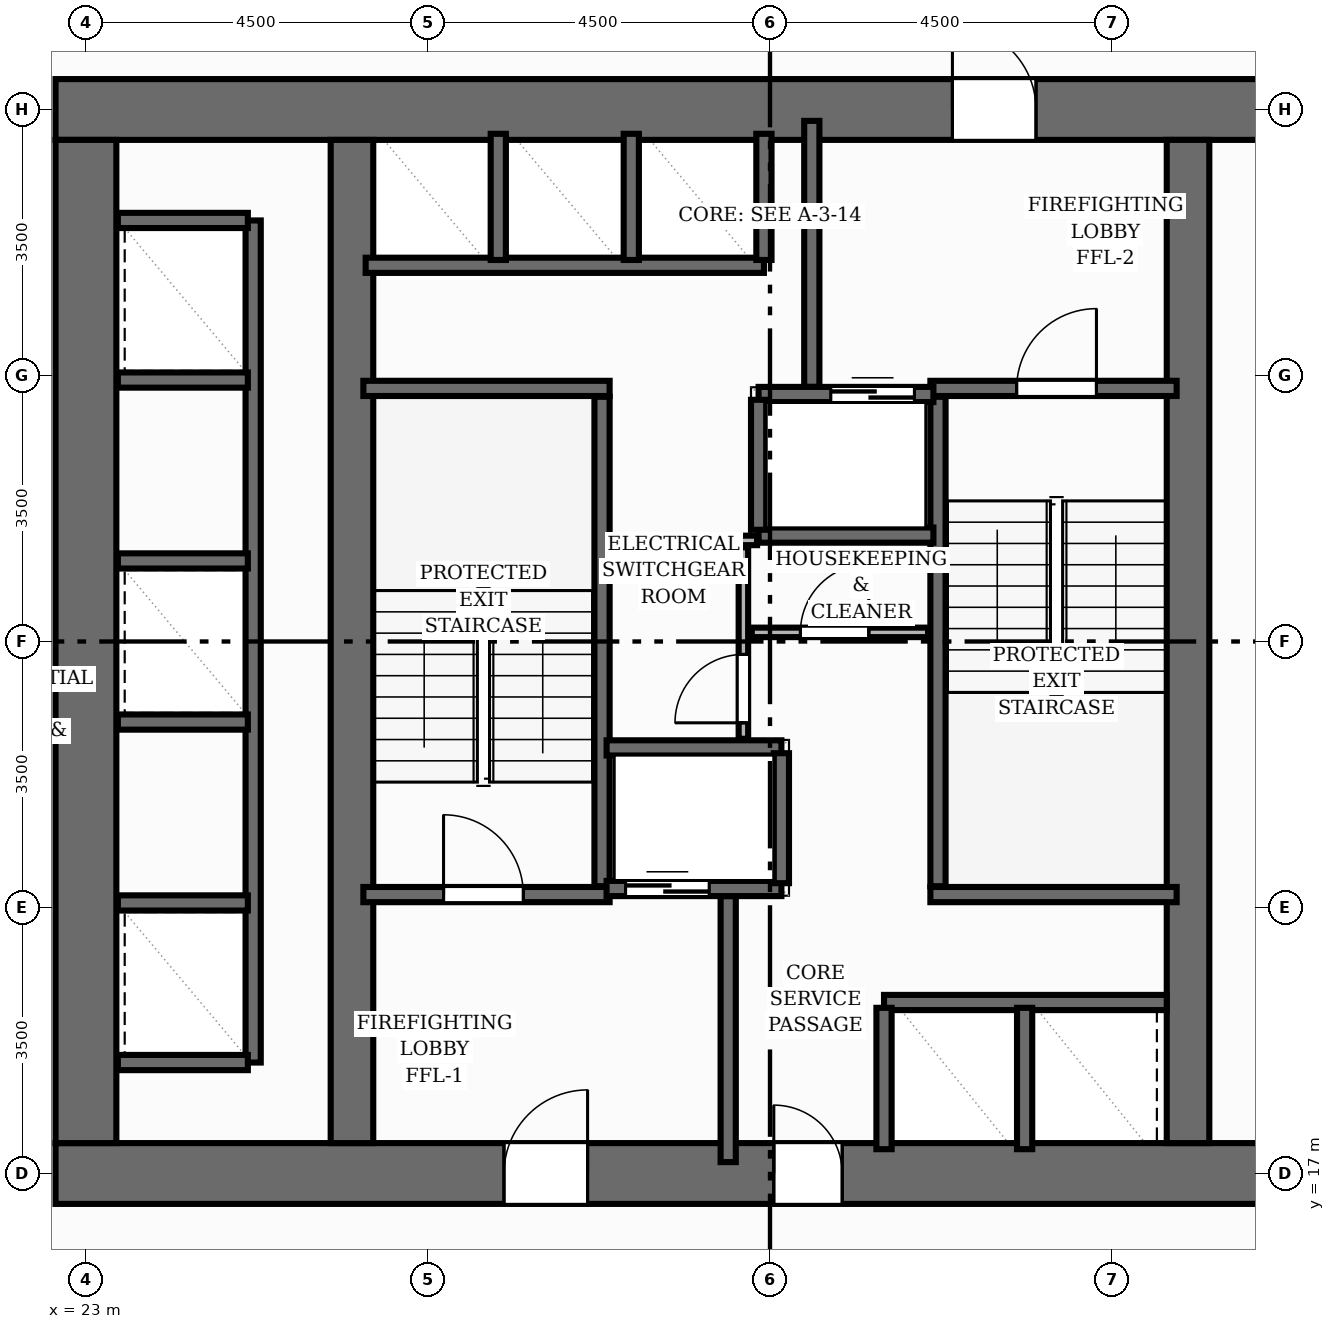
"""IFC4 building model, lengths in metres.
Left out: names, types, materials, properties, quantities, classifications, styles, units other than length and angle.
Written with IfcOpenShell. Run it as: python <this file> out.ifc"""

import sys

from ifc_helpers import new_model, si_unit, direction, frame, frame_2d, origin, place, context, subcontext, project, spatial, rectangle, extrude, element, fill, save


model = new_model("IFC4")
c1 = context("Model", 3, precision=1e-05, world=origin(), true_north=direction((0.0, 1.0)))
c2 = subcontext(c1, "Body", "Model", "MODEL_VIEW")
j1 = project(units=[si_unit("LENGTHUNIT", "METRE"), si_unit("PLANEANGLEUNIT", "RADIAN")], contexts=[c1])
p1 = place(None, origin())
s1 = spatial("IfcSite", under=j1, at=p1, CompositionType="ELEMENT")
p2 = place(p1, origin())
s2 = spatial("IfcBuilding", under=s1, at=p2, CompositionType="ELEMENT")
p3 = place(p2, frame((0.0, 0.0, 53.6)))
s3 = spatial("IfcBuildingStorey", under=s2, at=p3, CompositionType="ELEMENT", Elevation=53.6)
p4 = place(p3, frame((22.6, 17.0, 0.0), z_axis=(0.0, 0.0, 1.0), x_axis=(1.0, 0.0, 0.0)))
e1 = element("IfcWall", 1, at=p4, inside=s3, PredefinedType="SHEAR", context=c2, shape_type="SweptSolid", body=[
    extrude(rectangle(XDim=18.8, YDim=0.8, at=frame_2d((9.4, 0.0))), origin(), (0.0, 0.0, 1.0), 3.2),
])
p5 = place(p4, frame((5.9, 0.0, 0.0)))
e2 = element("IfcOpeningElement", 2, at=p5, cuts=e1, PredefinedType="OPENING", context=c2, shape_type="SweptSolid", body=[
    extrude(rectangle(XDim=1.1, YDim=2.15, at=frame_2d((0.55, 1.075))), frame((0.0, 0.41, 0.0), z_axis=(0.0, -1.0, 0.0), x_axis=(1.0, 0.0, 0.0)), (0.0, 0.0, 1.0), 0.82),
])
p6 = place(p4, frame((9.45, 0.0, 0.0)))
e3 = element("IfcOpeningElement", 3, at=p6, cuts=e1, PredefinedType="OPENING", context=c2, shape_type="SweptSolid", body=[
    extrude(rectangle(XDim=0.9, YDim=2.1, at=frame_2d((0.45, 1.05))), frame((0.0, 0.41, 0.0), z_axis=(0.0, -1.0, 0.0), x_axis=(1.0, 0.0, 0.0)), (0.0, 0.0, 1.0), 0.82),
])
p7 = place(p3, frame((22.6, 31.0, 0.0), z_axis=(0.0, 0.0, 1.0), x_axis=(1.0, 0.0, 0.0)))
e4 = element("IfcWall", 4, at=p7, inside=s3, PredefinedType="SHEAR", context=c2, shape_type="SweptSolid", body=[
    extrude(rectangle(XDim=18.8, YDim=0.8, at=frame_2d((9.4, 0.0))), origin(), (0.0, 0.0, 1.0), 3.2),
])
p8 = place(p7, frame((11.8, 0.0, 0.0)))
e5 = element("IfcOpeningElement", 5, at=p8, cuts=e4, PredefinedType="OPENING", context=c2, shape_type="SweptSolid", body=[
    extrude(rectangle(XDim=1.1, YDim=2.15, at=frame_2d((0.55, 1.075))), frame((0.0, 0.41, 0.0), z_axis=(0.0, -1.0, 0.0), x_axis=(1.0, 0.0, 0.0)), (0.0, 0.0, 1.0), 0.82),
])
p9 = place(p3, frame((23.0, 17.4, 0.0), z_axis=(0.0, 0.0, 1.0), x_axis=(0.0, 1.0, 0.0)))
e6 = element("IfcWall", 6, at=p9, inside=s3, PredefinedType="SHEAR", context=c2, shape_type="SweptSolid", body=[
    extrude(rectangle(XDim=13.2, YDim=0.8, at=frame_2d((6.6, 0.0))), origin(), (0.0, 0.0, 1.0), 3.2),
])
for number, where, z_axis, x_axis in (
    (7, (26.5, 17.4, 0.0), (0.0, 0.0, 1.0), (0.0, 1.0, 0.0)),
    (8, (37.5, 17.4, 0.0), (0.0, 0.0, 1.0), (0.0, 1.0, 0.0)),
):
    element("IfcWall", number, at=place(p3, frame(where, z_axis=z_axis, x_axis=x_axis)), inside=s3, PredefinedType="SHEAR", context=c2, shape_type="SweptSolid", body=[
        extrude(rectangle(XDim=13.2, YDim=0.56, at=frame_2d((6.6, 0.0))), origin(), (0.0, 0.0, 1.0), 3.2),
    ])
p10 = place(p3, frame((29.79, 20.78, 0.0), z_axis=(0.0, 0.0, 1.0), x_axis=(0.0, 1.0, 0.0)))
e9 = element("IfcWall", 9, at=p10, inside=s3, PredefinedType="SHEAR", context=c2, shape_type="SweptSolid", body=[
    extrude(rectangle(XDim=6.44, YDim=0.2, at=frame_2d((3.22, 0.0))), origin(), (0.0, 0.0, 1.0), 3.2),
])
p11 = place(p3, frame((26.65, 27.33, 0.0), z_axis=(0.0, 0.0, 1.0), x_axis=(1.0, 0.0, 0.0)))
e10 = element("IfcWall", 10, at=p11, inside=s3, PredefinedType="SHEAR", context=c2, shape_type="SweptSolid", body=[
    extrude(rectangle(XDim=3.24, YDim=0.2, at=frame_2d((1.62, 0.0))), origin(), (0.0, 0.0, 1.0), 3.2),
])
p12 = place(p3, frame((26.65, 20.67, 0.0), z_axis=(0.0, 0.0, 1.0), x_axis=(1.0, 0.0, 0.0)))
e11 = element("IfcWall", 11, at=p12, inside=s3, PredefinedType="SHEAR", context=c2, shape_type="SweptSolid", body=[
    extrude(rectangle(XDim=3.24, YDim=0.2, at=frame_2d((1.62, 0.0))), origin(), (0.0, 0.0, 1.0), 3.2),
])
p13 = place(p12, frame((1.055, 0.0, 0.0)))
e12 = element("IfcOpeningElement", 12, at=p13, cuts=e11, PredefinedType="OPENING", context=c2, shape_type="SweptSolid", body=[
    extrude(rectangle(XDim=1.05, YDim=2.15, at=frame_2d((0.525, 1.075))), frame((0.0, 0.11, 0.0), z_axis=(0.0, -1.0, 0.0), x_axis=(1.0, 0.0, 0.0)), (0.0, 0.0, 1.0), 0.22),
])
p14 = place(p3, frame((34.21, 20.78, 0.0), z_axis=(0.0, 0.0, 1.0), x_axis=(0.0, 1.0, 0.0)))
e13 = element("IfcWall", 13, at=p14, inside=s3, PredefinedType="SHEAR", context=c2, shape_type="SweptSolid", body=[
    extrude(rectangle(XDim=6.44, YDim=0.2, at=frame_2d((3.22, 0.0))), origin(), (0.0, 0.0, 1.0), 3.2),
])
p15 = place(p3, frame((34.11, 20.67, 0.0), z_axis=(0.0, 0.0, 1.0), x_axis=(1.0, 0.0, 0.0)))
e14 = element("IfcWall", 14, at=p15, inside=s3, PredefinedType="SHEAR", context=c2, shape_type="SweptSolid", body=[
    extrude(rectangle(XDim=3.24, YDim=0.2, at=frame_2d((1.62, 0.0))), origin(), (0.0, 0.0, 1.0), 3.2),
])
p16 = place(p3, frame((34.11, 27.33, 0.0), z_axis=(0.0, 0.0, 1.0), x_axis=(1.0, 0.0, 0.0)))
e15 = element("IfcWall", 15, at=p16, inside=s3, PredefinedType="SHEAR", context=c2, shape_type="SweptSolid", body=[
    extrude(rectangle(XDim=3.24, YDim=0.2, at=frame_2d((1.62, 0.0))), origin(), (0.0, 0.0, 1.0), 3.2),
])
p17 = place(p16, frame((1.135, 0.0, 0.0)))
e16 = element("IfcOpeningElement", 16, at=p17, cuts=e15, PredefinedType="OPENING", context=c2, shape_type="SweptSolid", body=[
    extrude(rectangle(XDim=1.05, YDim=2.15, at=frame_2d((0.525, 1.075))), frame((0.0, 0.11, 0.0), z_axis=(0.0, -1.0, 0.0), x_axis=(1.0, 0.0, 0.0)), (0.0, 0.0, 1.0), 0.22),
])
for number, where, z_axis, x_axis in (
    (17, (31.45, 17.15, 0.0), (0.0, 0.0, 1.0), (0.0, 1.0, 0.0)),
    (18, (32.55, 27.35, 0.0), (0.0, 0.0, 1.0), (0.0, 1.0, 0.0)),
):
    element("IfcWall", number, at=place(p3, frame(where, z_axis=z_axis, x_axis=x_axis)), inside=s3, PredefinedType="SHEAR", context=c2, shape_type="SweptSolid", body=[
        extrude(rectangle(XDim=3.5, YDim=0.2, at=frame_2d((1.75, 0.0))), origin(), (0.0, 0.0, 1.0), 3.2),
    ])
p18 = place(p3, frame((29.85, 20.75, 0.0), z_axis=(0.0, 0.0, 1.0), x_axis=(1.0, 0.0, 0.0)))
e19 = element("IfcWall", 19, at=p18, inside=s3, PredefinedType="SHEAR", context=c2, shape_type="SweptSolid", body=[
    extrude(rectangle(XDim=2.3, YDim=0.2, at=frame_2d((1.15, 0.0))), origin(), (0.0, 0.0, 1.0), 3.2),
])
p19 = place(p18, frame((0.25, 0.0, 0.0)))
e20 = element("IfcOpeningElement", 20, at=p19, cuts=e19, PredefinedType="OPENING", context=c2, shape_type="SweptSolid", body=[
    extrude(rectangle(XDim=1.1, YDim=2.15, at=frame_2d((0.55, 1.075))), frame((0.0, 0.11, 0.0), z_axis=(0.0, -1.0, 0.0), x_axis=(1.0, 0.0, 0.0)), (0.0, 0.0, 1.0), 0.22),
])
p20 = place(p3, frame((29.85, 22.6, 0.0), z_axis=(0.0, 0.0, 1.0), x_axis=(1.0, 0.0, 0.0)))
e21 = element("IfcWall", 21, at=p20, inside=s3, PredefinedType="SHEAR", context=c2, shape_type="SweptSolid", body=[
    extrude(rectangle(XDim=2.3, YDim=0.2, at=frame_2d((1.15, 0.0))), origin(), (0.0, 0.0, 1.0), 3.2),
])
p21 = place(p3, frame((32.15, 20.82, 0.0), z_axis=(0.0, 0.0, 1.0), x_axis=(0.0, 1.0, 0.0)))
e22 = element("IfcWall", 22, at=p21, inside=s3, PredefinedType="SHEAR", context=c2, shape_type="SweptSolid", body=[
    extrude(rectangle(XDim=1.71, YDim=0.2, at=frame_2d((0.855, 0.0))), origin(), (0.0, 0.0, 1.0), 3.2),
])
p22 = place(p3, frame((31.85, 27.25, 0.0), z_axis=(0.0, 0.0, 1.0), x_axis=(1.0, 0.0, 0.0)))
e23 = element("IfcWall", 23, at=p22, inside=s3, PredefinedType="SHEAR", context=c2, shape_type="SweptSolid", body=[
    extrude(rectangle(XDim=2.3, YDim=0.2, at=frame_2d((1.15, 0.0))), origin(), (0.0, 0.0, 1.0), 3.2),
])
p23 = place(p22, frame((0.95, 0.0, 0.0)))
e24 = element("IfcOpeningElement", 24, at=p23, cuts=e23, PredefinedType="OPENING", context=c2, shape_type="SweptSolid", body=[
    extrude(rectangle(XDim=1.1, YDim=2.15, at=frame_2d((0.55, 1.075))), frame((0.0, 0.11, 0.0), z_axis=(0.0, -1.0, 0.0), x_axis=(1.0, 0.0, 0.0)), (0.0, 0.0, 1.0), 0.22),
])
p24 = place(p3, frame((31.85, 25.4, 0.0), z_axis=(0.0, 0.0, 1.0), x_axis=(1.0, 0.0, 0.0)))
e25 = element("IfcWall", 25, at=p24, inside=s3, PredefinedType="SHEAR", context=c2, shape_type="SweptSolid", body=[
    extrude(rectangle(XDim=2.3, YDim=0.2, at=frame_2d((1.15, 0.0))), origin(), (0.0, 0.0, 1.0), 3.2),
])
p25 = place(p3, frame((31.85, 25.47, 0.0), z_axis=(0.0, 0.0, 1.0), x_axis=(0.0, 1.0, 0.0)))
e26 = element("IfcWall", 26, at=p25, inside=s3, PredefinedType="SHEAR", context=c2, shape_type="SweptSolid", body=[
    extrude(rectangle(XDim=1.71, YDim=0.2, at=frame_2d((0.855, 0.0))), origin(), (0.0, 0.0, 1.0), 3.2),
])
p26 = place(p3, frame((25.2, 18.46, 0.0), z_axis=(0.0, 0.0, 1.0), x_axis=(0.0, 1.0, 0.0)))
e27 = element("IfcWall", 27, at=p26, inside=s3, PredefinedType="SHEAR", context=c2, shape_type="SweptSolid", body=[
    extrude(rectangle(XDim=11.08, YDim=0.2, at=frame_2d((5.54, 0.0))), origin(), (0.0, 0.0, 1.0), 3.2),
])
for number, where, z_axis, x_axis in (
    (28, (23.42, 18.46, 0.0), (0.0, 0.0, 1.0), (1.0, 0.0, 0.0)),
    (29, (23.42, 29.54, 0.0), (0.0, 0.0, 1.0), (1.0, 0.0, 0.0)),
    (30, (23.42, 20.56, 0.0), (0.0, 0.0, 1.0), (1.0, 0.0, 0.0)),
    (31, (23.42, 22.94, 0.0), (0.0, 0.0, 1.0), (1.0, 0.0, 0.0)),
    (32, (23.42, 25.06, 0.0), (0.0, 0.0, 1.0), (1.0, 0.0, 0.0)),
    (33, (23.42, 27.44, 0.0), (0.0, 0.0, 1.0), (1.0, 0.0, 0.0)),
):
    element("IfcWall", number, at=place(p3, frame(where, z_axis=z_axis, x_axis=x_axis)), inside=s3, PredefinedType="SHEAR", context=c2, shape_type="SweptSolid", body=[
        extrude(rectangle(XDim=1.71, YDim=0.2, at=frame_2d((0.855, 0.0))), origin(), (0.0, 0.0, 1.0), 3.2),
    ])
p27 = place(p3, frame((26.68, 28.95, 0.0), z_axis=(0.0, 0.0, 1.0), x_axis=(1.0, 0.0, 0.0)))
e34 = element("IfcWall", 34, at=p27, inside=s3, PredefinedType="SHEAR", context=c2, shape_type="SweptSolid", body=[
    extrude(rectangle(XDim=5.24, YDim=0.2, at=frame_2d((2.62, 0.0))), origin(), (0.0, 0.0, 1.0), 3.2),
])
for number, where, z_axis, x_axis in (
    (35, (31.92, 29.02, 0.0), (0.0, 0.0, 1.0), (0.0, 1.0, 0.0)),
    (36, (28.425, 29.02, 0.0), (0.0, 0.0, 1.0), (0.0, 1.0, 0.0)),
    (37, (30.175, 29.02, 0.0), (0.0, 0.0, 1.0), (0.0, 1.0, 0.0)),
):
    element("IfcWall", number, at=place(p3, frame(where, z_axis=z_axis, x_axis=x_axis)), inside=s3, PredefinedType="SHEAR", context=c2, shape_type="SweptSolid", body=[
        extrude(rectangle(XDim=1.66, YDim=0.2, at=frame_2d((0.83, 0.0))), origin(), (0.0, 0.0, 1.0), 3.2),
    ])
p28 = place(p3, frame((33.5, 19.25, 0.0), z_axis=(0.0, 0.0, 1.0), x_axis=(1.0, 0.0, 0.0)))
e38 = element("IfcWall", 38, at=p28, inside=s3, PredefinedType="SHEAR", context=c2, shape_type="SweptSolid", body=[
    extrude(rectangle(XDim=3.72, YDim=0.2, at=frame_2d((1.86, 0.0))), origin(), (0.0, 0.0, 1.0), 3.2),
])
for number, where, z_axis, x_axis in (
    (39, (33.5, 17.32, 0.0), (0.0, 0.0, 1.0), (0.0, 1.0, 0.0)),
    (40, (35.35, 17.32, 0.0), (0.0, 0.0, 1.0), (0.0, 1.0, 0.0)),
):
    element("IfcWall", number, at=place(p3, frame(where, z_axis=z_axis, x_axis=x_axis)), inside=s3, PredefinedType="SHEAR", context=c2, shape_type="SweptSolid", body=[
        extrude(rectangle(XDim=1.86, YDim=0.2, at=frame_2d((0.93, 0.0))), origin(), (0.0, 0.0, 1.0), 3.2),
    ])
p29 = place(p3, frame((31.65, 22.72, 0.0), z_axis=(0.0, 0.0, 1.0), x_axis=(0.0, 1.0, 0.0)))
e41 = element("IfcWall", 41, at=p29, inside=s3, PredefinedType="PARTITIONING", context=c2, shape_type="SweptSolid", body=[
    extrude(rectangle(XDim=2.52, YDim=0.125, at=frame_2d((1.26, 0.0))), origin(), (0.0, 0.0, 1.0), 2.955),
])
p30 = place(p29, frame((0.21, 0.0, 0.0)))
e42 = element("IfcOpeningElement", 42, at=p30, cuts=e41, PredefinedType="OPENING", context=c2, shape_type="SweptSolid", body=[
    extrude(rectangle(XDim=0.9, YDim=2.1, at=frame_2d((0.45, 1.05))), frame((0.0, 0.073, 0.0), z_axis=(0.0, -1.0, 0.0), x_axis=(1.0, 0.0, 0.0)), (0.0, 0.0, 1.0), 0.145),
])
p31 = place(p3, frame((31.76, 24.12, 0.0), z_axis=(0.0, 0.0, 1.0), x_axis=(1.0, 0.0, 0.0)))
e43 = element("IfcWall", 43, at=p31, inside=s3, PredefinedType="PARTITIONING", context=c2, shape_type="SweptSolid", body=[
    extrude(rectangle(XDim=2.32, YDim=0.125, at=frame_2d((1.16, 0.0))), origin(), (0.0, 0.0, 1.0), 2.955),
])
p32 = place(p31, frame((0.64, 0.0, 0.0)))
e44 = element("IfcOpeningElement", 44, at=p32, cuts=e43, PredefinedType="OPENING", context=c2, shape_type="SweptSolid", body=[
    extrude(rectangle(XDim=0.9, YDim=2.1, at=frame_2d((0.45, 1.05))), frame((0.0, 0.073, 0.0), z_axis=(0.0, -1.0, 0.0), x_axis=(1.0, 0.0, 0.0)), (0.0, 0.0, 1.0), 0.145),
])
p33 = place(p3, frame((29.89, 25.33, 0.0), z_axis=(0.0, 0.0, 1.0), x_axis=(1.0, 0.0, 0.0)))
e45 = element("IfcWall", 45, at=p33, inside=s3, PredefinedType="PARTITIONING", context=c2, shape_type="SweptSolid", body=[
    extrude(rectangle(XDim=1.94, YDim=0.125, at=frame_2d((0.97, 0.0))), origin(), (0.0, 0.0, 1.0), 2.955),
])
p34 = place(p3, frame((45.278, 16.459, 0.0), z_axis=(0.0, 0.0, 1.0), x_axis=(-0.810668637761, -0.585505217526, 0.0)))
e46 = element("IfcWall", 46, at=p34, inside=s3, PredefinedType="PARTITIONING", context=c2, shape_type="SweptSolid", body=[
    extrude(rectangle(XDim=11.55, YDim=0.125, at=frame_2d((5.775, 0.0))), origin(), (0.0, 0.0, 1.0), 2.955),
])
p35 = place(p34, frame((4.625, 0.0, 0.0)))
e47 = element("IfcOpeningElement", 47, at=p35, cuts=e46, PredefinedType="OPENING", context=c2, shape_type="SweptSolid", body=[
    extrude(rectangle(XDim=0.9, YDim=2.1, at=frame_2d((0.45, 1.05))), frame((0.0, 0.073, 0.0), z_axis=(0.0, -1.0, 0.0), x_axis=(1.0, 0.0, 0.0)), (0.0, 0.0, 1.0), 0.145),
])
p36 = place(p13, origin())
e48 = element("IfcDoor", 48, at=p36, inside=s3, OperationType="SINGLE_SWING_LEFT", PredefinedType="DOOR", context=c2, shape_type="SweptSolid", body=[
    extrude(rectangle(XDim=1.05, YDim=2.15, at=frame_2d((0.525, 1.075))), frame((0.0, 0.025, 0.0), z_axis=(0.0, -1.0, 0.0), x_axis=(1.0, 0.0, 0.0)), (0.0, 0.0, 1.0), 0.05),
])
fill(e12, e48)
p37 = place(p17, origin())
e49 = element("IfcDoor", 49, at=p37, inside=s3, OperationType="SINGLE_SWING_RIGHT", PredefinedType="DOOR", context=c2, shape_type="SweptSolid", body=[
    extrude(rectangle(XDim=1.05, YDim=2.15, at=frame_2d((0.525, 1.075))), frame((0.0, 0.025, 0.0), z_axis=(0.0, -1.0, 0.0), x_axis=(1.0, 0.0, 0.0)), (0.0, 0.0, 1.0), 0.05),
])
fill(e16, e49)
p38 = place(p5, origin())
e50 = element("IfcDoor", 50, at=p38, inside=s3, OperationType="SINGLE_SWING_RIGHT", PredefinedType="DOOR", context=c2, shape_type="SweptSolid", body=[
    extrude(rectangle(XDim=1.1, YDim=2.15, at=frame_2d((0.55, 1.075))), frame((0.0, 0.025, 0.0), z_axis=(0.0, -1.0, 0.0), x_axis=(1.0, 0.0, 0.0)), (0.0, 0.0, 1.0), 0.05),
])
fill(e2, e50)
p39 = place(p8, origin())
e51 = element("IfcDoor", 51, at=p39, inside=s3, OperationType="SINGLE_SWING_LEFT", PredefinedType="DOOR", context=c2, shape_type="SweptSolid", body=[
    extrude(rectangle(XDim=1.1, YDim=2.15, at=frame_2d((0.55, 1.075))), frame((0.0, 0.025, 0.0), z_axis=(0.0, -1.0, 0.0), x_axis=(1.0, 0.0, 0.0)), (0.0, 0.0, 1.0), 0.05),
])
fill(e5, e51)
p40 = place(p19, origin())
e52 = element("IfcDoor", 52, at=p40, inside=s3, OperationType="DOUBLE_DOOR_SLIDING", PredefinedType="DOOR", context=c2, shape_type="SweptSolid", body=[
    extrude(rectangle(XDim=1.1, YDim=2.15, at=frame_2d((0.55, 1.075))), frame((0.0, 0.025, 0.0), z_axis=(0.0, -1.0, 0.0), x_axis=(1.0, 0.0, 0.0)), (0.0, 0.0, 1.0), 0.05),
])
fill(e20, e52)
p41 = place(p23, origin())
e53 = element("IfcDoor", 53, at=p41, inside=s3, OperationType="DOUBLE_DOOR_SLIDING", PredefinedType="DOOR", context=c2, shape_type="SweptSolid", body=[
    extrude(rectangle(XDim=1.1, YDim=2.15, at=frame_2d((0.55, 1.075))), frame((0.0, 0.025, 0.0), z_axis=(0.0, -1.0, 0.0), x_axis=(1.0, 0.0, 0.0)), (0.0, 0.0, 1.0), 0.05),
])
fill(e24, e53)
p42 = place(p6, origin())
e54 = element("IfcDoor", 54, at=p42, inside=s3, OperationType="SINGLE_SWING_LEFT", PredefinedType="DOOR", context=c2, shape_type="SweptSolid", body=[
    extrude(rectangle(XDim=0.9, YDim=2.1, at=frame_2d((0.45, 1.05))), frame((0.0, 0.025, 0.0), z_axis=(0.0, -1.0, 0.0), x_axis=(1.0, 0.0, 0.0)), (0.0, 0.0, 1.0), 0.05),
])
fill(e3, e54)
p43 = place(p30, origin())
e55 = element("IfcDoor", 55, at=p43, inside=s3, OperationType="SINGLE_SWING_LEFT", PredefinedType="DOOR", context=c2, shape_type="SweptSolid", body=[
    extrude(rectangle(XDim=0.9, YDim=2.1, at=frame_2d((0.45, 1.05))), frame((0.0, 0.025, 0.0), z_axis=(0.0, -1.0, 0.0), x_axis=(1.0, 0.0, 0.0)), (0.0, 0.0, 1.0), 0.05),
])
fill(e42, e55)
p44 = place(p32, origin())
e56 = element("IfcDoor", 56, at=p44, inside=s3, OperationType="SINGLE_SWING_RIGHT", PredefinedType="DOOR", context=c2, shape_type="SweptSolid", body=[
    extrude(rectangle(XDim=0.9, YDim=2.1, at=frame_2d((0.45, 1.05))), frame((0.0, 0.025, 0.0), z_axis=(0.0, -1.0, 0.0), x_axis=(1.0, 0.0, 0.0)), (0.0, 0.0, 1.0), 0.05),
])
fill(e44, e56)
save(model, sys.argv[1])
